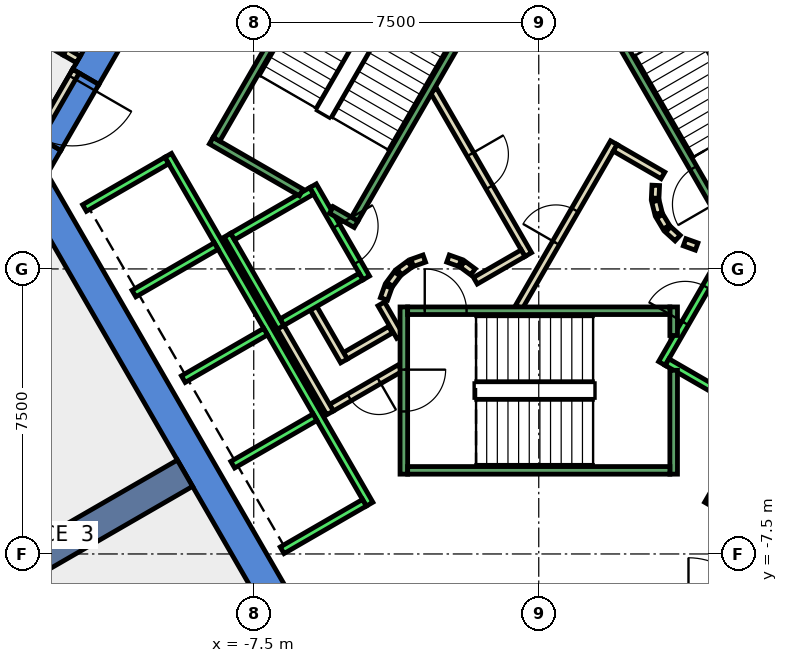
"""IFC4 building model, lengths in metres.
Left out: names, types, materials, properties, quantities, classifications, styles, units other than length and angle.
Written with IfcOpenShell. Run it as: python <this file> out.ifc"""

import sys

from ifc_helpers import new_model, si_unit, direction, frame, frame_2d, origin, place, context, subcontext, project, spatial, polyline, rectangle, outline, extrude, element, fill, save


model = new_model("IFC4")
c1 = context("Model", 3, precision=1e-05, world=origin(), true_north=direction((0.0, 1.0)))
c2 = subcontext(c1, "Body", "Model", "MODEL_VIEW")
j1 = project(units=[si_unit("LENGTHUNIT", "METRE"), si_unit("PLANEANGLEUNIT", "RADIAN")], contexts=[c1])
p1 = place(None, origin())
s1 = spatial("IfcSite", under=j1, at=p1, CompositionType="ELEMENT")
p2 = place(p1, origin())
s2 = spatial("IfcBuilding", under=s1, at=p2, CompositionType="ELEMENT")
p3 = place(p2, frame((0.0, 0.0, 159.2)))
s3 = spatial("IfcBuildingStorey", under=s2, at=p3, CompositionType="ELEMENT", Elevation=159.2)
p4 = place(p3, frame((0.0, 0.0, -0.4)))
e1 = element("IfcWall", 1, at=p4, inside=s3, PredefinedType="SHEAR", context=c2, shape_type="SweptSolid", body=[
    extrude(outline(polyline([(-12.267, 5.252), (-11.575, 4.852), (-6.466, 13.7), (-6.928, 14.5), (-12.267, 5.252)])), origin(), (0.0, 0.0, 1.0), 4.2),
])
p5 = place(p3, frame((0.0, 0.0, -0.4)))
e2 = element("IfcWall", 2, at=p5, inside=s3, PredefinedType="SHEAR", context=c2, shape_type="SweptSolid", body=[
    extrude(outline(polyline([(-12.575, 3.12), (-13.267, 3.52), (-13.856, 2.5), (-12.933, 2.5), (-12.575, 3.12)])), origin(), (0.0, 0.0, 1.0), 4.2),
])
p6 = place(p3, frame((0.0, 0.0, 3.6)))
e3 = element("IfcWall", 3, at=p6, inside=s3, PredefinedType="SHEAR", context=c2, shape_type="SweptSolid", body=[
    extrude(outline(polyline([(-13.267, 3.52), (-12.575, 3.12), (-11.575, 4.852), (-12.267, 5.252), (-13.267, 3.52)])), origin(), (0.0, 0.0, 1.0), 0.2),
])
p7 = place(p3, frame((0.0, 0.0, -0.4)))
e4 = element("IfcWall", 4, at=p7, inside=s3, PredefinedType="SHEAR", context=c2, shape_type="SweptSolid", body=[
    extrude(outline(polyline([(-13.856, 2.5), (-6.928, -9.5), (-6.466, -8.7), (-12.933, 2.5), (-13.856, 2.5)])), origin(), (0.0, 0.0, 1.0), 4.2),
])
p8 = place(p3, frame((-9.31, -5.375, -0.4), z_axis=(0.0, 0.0, 1.0), x_axis=(-0.866017533419, -0.500013631625, 0.0)))
e5 = element("IfcWall", 5, at=p8, inside=s3, PredefinedType="SHEAR", context=c2, shape_type="SweptSolid", body=[
    extrude(rectangle(XDim=9.0, YDim=0.8, at=frame_2d((4.5, 0.0))), origin(), (0.0, 0.0, 1.0), 4.2),
])
p9 = place(p3, frame((-14.359, 6.806, 0.0), z_axis=(0.0, 0.0, 1.0), x_axis=(0.866155875717, -0.499773947861, 0.0)))
e6 = element("IfcWall", 6, at=p9, inside=s3, PredefinedType="PARTITIONING", context=c2, shape_type="SweptSolid", body=[
    extrude(rectangle(XDim=2.189, YDim=0.2, at=frame_2d((1.094, 0.0))), origin(), (0.0, 0.0, 1.0), 3.8),
])
p10 = place(p3, frame((-3.9, -1.599, 0.0), z_axis=(0.0, 0.0, 1.0), x_axis=(-0.865969445389, -0.500096910261, 0.0)))
e7 = element("IfcWall", 7, at=p10, inside=s3, PredefinedType="PARTITIONING", context=c2, shape_type="SweptSolid", body=[
    extrude(rectangle(XDim=1.373, YDim=0.2, at=frame_2d((0.687, 0.0))), origin(), (0.0, 0.0, 1.0), 3.8),
])
p11 = place(p3, frame((-5.126, -2.422, 0.0), z_axis=(0.0, 0.0, 1.0), x_axis=(-0.500062241894, 0.865989465428, 0.0)))
e8 = element("IfcWall", 8, at=p11, inside=s3, PredefinedType="PARTITIONING", context=c2, shape_type="SweptSolid", body=[
    extrude(rectangle(XDim=1.7, YDim=0.2, at=frame_2d((0.85, 0.0))), origin(), (0.0, 0.0, 1.0), 3.8),
])
p12 = place(p3, frame((-3.65, -2.61, 0.0), z_axis=(0.0, 0.0, 1.0), x_axis=(-0.866072462134, -0.499918483688, 0.0)))
e9 = element("IfcWall", 9, at=p12, inside=s3, PredefinedType="PARTITIONING", context=c2, shape_type="SweptSolid", body=[
    extrude(rectangle(XDim=2.084, YDim=0.2, at=frame_2d((1.042, 0.0))), origin(), (0.0, 0.0, 1.0), 3.8),
])
p13 = place(p12, frame((0.642, 0.0, 0.0)))
e10 = element("IfcOpeningElement", 10, at=p13, cuts=e9, PredefinedType="OPENING", context=c2, shape_type="SweptSolid", body=[
    extrude(rectangle(XDim=0.9, YDim=2.1, at=frame_2d((0.45, 1.05))), frame((0.0, 0.11, 0.0), z_axis=(0.0, -1.0, 0.0), x_axis=(1.0, 0.0, 0.0)), (0.0, 0.0, 1.0), 0.22),
])
p14 = place(p3, frame((-5.492, -3.788, 0.0), z_axis=(0.0, 0.0, 1.0), x_axis=(-0.500008949224, 0.866020236886, 0.0)))
e11 = element("IfcWall", 11, at=p14, inside=s3, PredefinedType="PARTITIONING", context=c2, shape_type="SweptSolid", body=[
    extrude(rectangle(XDim=2.68, YDim=0.2, at=frame_2d((1.34, 0.0))), origin(), (0.0, 0.0, 1.0), 3.8),
])
p15 = place(p3, frame((-4.145, -0.92, 0.0), z_axis=(0.0, 0.0, 1.0), x_axis=(0.499743786207, -0.866173278362, 0.0)))
e12 = element("IfcWall", 12, at=p15, inside=s3, PredefinedType="PARTITIONING", context=c2, shape_type="SweptSolid", body=[
    extrude(rectangle(XDim=0.991, YDim=0.2, at=frame_2d((0.495, 0.0))), origin(), (0.0, 0.0, 1.0), 3.8),
])
p16 = place(p3, frame((-0.52, -1.0, 0.0), z_axis=(0.0, 0.0, 1.0), x_axis=(0.50011622646, 0.865958290007, 0.0)))
e13 = element("IfcWall", 13, at=p16, inside=s3, PredefinedType="PARTITIONING", context=c2, shape_type="SweptSolid", body=[
    extrude(rectangle(XDim=4.991, YDim=0.2, at=frame_2d((2.496, 0.0))), origin(), (0.0, 0.0, 1.0), 3.8),
])
p17 = place(p16, frame((1.945, 0.0, 0.0)))
e14 = element("IfcOpeningElement", 14, at=p17, cuts=e13, PredefinedType="OPENING", context=c2, shape_type="SweptSolid", body=[
    extrude(rectangle(XDim=1.0, YDim=2.1, at=frame_2d((0.5, 1.05))), frame((0.0, 0.11, 0.0), z_axis=(0.0, -1.0, 0.0), x_axis=(1.0, 0.0, 0.0)), (0.0, 0.0, 1.0), 0.22),
])
p18 = place(p3, frame((2.012, 3.186, 0.0), z_axis=(0.0, 0.0, 1.0), x_axis=(0.865891012941, -0.500232699559, 0.0)))
e15 = element("IfcWall", 15, at=p18, inside=s3, PredefinedType="PARTITIONING", context=c2, shape_type="SweptSolid", body=[
    extrude(rectangle(XDim=1.449, YDim=0.2, at=frame_2d((0.725, 0.0))), origin(), (0.0, 0.0, 1.0), 3.8),
])
p19 = place(p3, frame((3.079, 2.199, 0.0), z_axis=(0.0, 0.0, 1.0), x_axis=(-0.047771483479, -0.998858290933, 0.0)))
e16 = element("IfcWall", 16, at=p19, inside=s3, PredefinedType="PARTITIONING", context=c2, shape_type="SweptSolid", body=[
    extrude(rectangle(XDim=0.337, YDim=0.2, at=frame_2d((0.169, 0.0))), origin(), (0.0, 0.0, 1.0), 3.8),
])
p20 = place(p3, frame((3.07, 1.786, 0.0), z_axis=(0.0, 0.0, 1.0), x_axis=(0.242705583207, -0.970099994784, 0.0)))
e17 = element("IfcWall", 17, at=p20, inside=s3, PredefinedType="PARTITIONING", context=c2, shape_type="SweptSolid", body=[
    extrude(rectangle(XDim=0.338, YDim=0.2, at=frame_2d((0.169, 0.0))), origin(), (0.0, 0.0, 1.0), 3.8),
])
for number, where, z_axis, x_axis in (
    (18, (3.182, 1.388, 0.0), (0.0, 0.0, 1.0), (0.512, -0.859, 0.0)),
    (19, (3.404, 1.039, 0.0), (0.0, 0.0, 1.0), (0.74, -0.672, 0.0)),
):
    element("IfcWall", number, at=place(p3, frame(where, z_axis=z_axis, x_axis=x_axis)), inside=s3, PredefinedType="PARTITIONING", context=c2, shape_type="SweptSolid", body=[
        extrude(rectangle(XDim=0.338, YDim=0.2, at=frame_2d((0.169, 0.0))), origin(), (0.0, 0.0, 1.0), 3.8),
    ])
p21 = place(p3, frame((3.838, 0.702, 0.0), z_axis=(0.0, 0.0, 1.0), x_axis=(0.941035081519, -0.338308993895, 0.0)))
e20 = element("IfcWall", 20, at=p21, inside=s3, PredefinedType="PARTITIONING", context=c2, shape_type="SweptSolid", body=[
    extrude(rectangle(XDim=0.337, YDim=0.2, at=frame_2d((0.168, 0.0))), origin(), (0.0, 0.0, 1.0), 3.8),
])
p22 = place(p3, frame((-2.771, 4.7, 0.0), z_axis=(0.0, 0.0, 1.0), x_axis=(0.499969479948, -0.866043023828, 0.0)))
e21 = element("IfcWall", 21, at=p22, inside=s3, PredefinedType="PARTITIONING", context=c2, shape_type="SweptSolid", body=[
    extrude(rectangle(XDim=4.99, YDim=0.2, at=frame_2d((2.495, 0.0))), origin(), (0.0, 0.0, 1.0), 3.8),
])
p23 = place(p22, frame((1.945, 0.0, 0.0)))
e22 = element("IfcOpeningElement", 22, at=p23, cuts=e21, PredefinedType="OPENING", context=c2, shape_type="SweptSolid", body=[
    extrude(rectangle(XDim=1.0, YDim=2.1, at=frame_2d((0.5, 1.05))), frame((0.0, 0.11, 0.0), z_axis=(0.0, -1.0, 0.0), x_axis=(1.0, 0.0, 0.0)), (0.0, 0.0, 1.0), 0.22),
])
p24 = place(p3, frame((-0.412, 0.414, 0.0), z_axis=(0.0, 0.0, 1.0), x_axis=(-0.866017369001, -0.500013916395, 0.0)))
e23 = element("IfcWall", 23, at=p24, inside=s3, PredefinedType="PARTITIONING", context=c2, shape_type="SweptSolid", body=[
    extrude(rectangle(XDim=1.45, YDim=0.2, at=frame_2d((0.725, 0.0))), origin(), (0.0, 0.0, 1.0), 3.8),
])
p25 = place(p3, frame((-1.731, -0.077, 0.0), z_axis=(0.0, 0.0, 1.0), x_axis=(-0.804311165252, 0.594208338422, 0.0)))
e24 = element("IfcWall", 24, at=p25, inside=s3, PredefinedType="PARTITIONING", context=c2, shape_type="SweptSolid", body=[
    extrude(rectangle(XDim=0.338, YDim=0.2, at=frame_2d((0.169, 0.0))), origin(), (0.0, 0.0, 1.0), 3.8),
])
p26 = place(p3, frame((-2.07, 0.16, 0.0), z_axis=(0.0, 0.0, 1.0), x_axis=(-0.942199461132, 0.335052496547, 0.0)))
e25 = element("IfcWall", 25, at=p26, inside=s3, PredefinedType="PARTITIONING", context=c2, shape_type="SweptSolid", body=[
    extrude(rectangle(XDim=0.337, YDim=0.2, at=frame_2d((0.169, 0.0))), origin(), (0.0, 0.0, 1.0), 3.8),
])
p27 = place(p3, frame((-3.012, 0.273, 0.0), z_axis=(0.0, 0.0, 1.0), x_axis=(-0.942280615813, -0.334824194261, 0.0)))
e26 = element("IfcWall", 26, at=p27, inside=s3, PredefinedType="PARTITIONING", context=c2, shape_type="SweptSolid", body=[
    extrude(rectangle(XDim=0.338, YDim=0.2, at=frame_2d((0.169, 0.0))), origin(), (0.0, 0.0, 1.0), 3.8),
])
p28 = place(p3, frame((-3.397, 0.124, 0.0), z_axis=(0.0, 0.0, 1.0), x_axis=(-0.804311165252, -0.594208338422, 0.0)))
e27 = element("IfcWall", 27, at=p28, inside=s3, PredefinedType="PARTITIONING", context=c2, shape_type="SweptSolid", body=[
    extrude(rectangle(XDim=0.338, YDim=0.2, at=frame_2d((0.169, 0.0))), origin(), (0.0, 0.0, 1.0), 3.8),
])
p29 = place(p3, frame((-3.723, -0.131, 0.0), z_axis=(0.0, 0.0, 1.0), x_axis=(-0.594675113454, -0.803966112121, 0.0)))
e28 = element("IfcWall", 28, at=p29, inside=s3, PredefinedType="PARTITIONING", context=c2, shape_type="SweptSolid", body=[
    extrude(rectangle(XDim=0.338, YDim=0.2, at=frame_2d((0.169, 0.0))), origin(), (0.0, 0.0, 1.0), 3.8),
])
p30 = place(p3, frame((-3.96, -0.47, 0.0), z_axis=(0.0, 0.0, 1.0), x_axis=(-0.334824194261, -0.942280615813, 0.0)))
e29 = element("IfcWall", 29, at=p30, inside=s3, PredefinedType="PARTITIONING", context=c2, shape_type="SweptSolid", body=[
    extrude(rectangle(XDim=0.338, YDim=0.2, at=frame_2d((0.169, 0.0))), origin(), (0.0, 0.0, 1.0), 3.8),
])
p31 = place(p3, frame((-12.18, 5.202, 0.0), z_axis=(0.0, 0.0, 1.0), x_axis=(-0.50002537861, -0.866010750942, 0.0)))
e30 = element("IfcWall", 30, at=p31, inside=s3, PredefinedType="PARTITIONING", context=c2, shape_type="SweptSolid", body=[
    extrude(rectangle(XDim=2.0, YDim=0.2, at=frame_2d((1.0, 0.0))), origin(), (0.0, 0.0, 1.0), 2.4),
])
p32 = place(p31, frame((0.19, 0.0, 0.0)))
e31 = element("IfcOpeningElement", 31, at=p32, cuts=e30, PredefinedType="OPENING", context=c2, shape_type="SweptSolid", body=[
    extrude(rectangle(XDim=1.8, YDim=2.1, at=frame_2d((0.9, 1.05))), frame((0.0, 0.11, 0.0), z_axis=(0.0, -1.0, 0.0), x_axis=(1.0, 0.0, 0.0)), (0.0, 0.0, 1.0), 0.22),
])
p33 = place(p3, frame((-12.463, 5.712, 0.0), z_axis=(0.0, 0.0, 1.0), x_axis=(0.865788603161, -0.500409926597, 0.0)))
e32 = element("IfcWall", 32, at=p33, inside=s3, PredefinedType="PARTITIONING", context=c2, shape_type="SweptSolid", body=[
    extrude(rectangle(XDim=0.4, YDim=0.2, at=frame_2d((0.2, 0.0))), origin(), (0.0, 0.0, 1.0), 2.4),
])
p34 = place(p3, frame((-5.94, 2.188, 0.0), z_axis=(0.0, 0.0, 1.0), x_axis=(0.49994636267, -0.866056369097, 0.0)))
e33 = element("IfcWall", 33, at=p34, inside=s3, PredefinedType="STANDARD", context=c2, shape_type="SweptSolid", body=[
    extrude(rectangle(XDim=2.8, YDim=0.2, at=frame_2d((1.4, 0.0))), origin(), (0.0, 0.0, 1.0), 3.8),
])
p35 = place(p34, frame((1.225, 0.0, 0.0)))
e34 = element("IfcOpeningElement", 34, at=p35, cuts=e33, PredefinedType="OPENING", context=c2, shape_type="SweptSolid", body=[
    extrude(rectangle(XDim=1.1, YDim=2.1, at=frame_2d((0.55, 1.05))), frame((0.0, 0.11, 0.0), z_axis=(0.0, -1.0, 0.0), x_axis=(1.0, 0.0, 0.0)), (0.0, 0.0, 1.0), 0.22),
])
p36 = place(p3, frame((-8.192, 0.888, 0.0), z_axis=(0.0, 0.0, 1.0), x_axis=(0.49994636267, -0.866056369097, 0.0)))
e35 = element("IfcWall", 35, at=p36, inside=s3, PredefinedType="STANDARD", context=c2, shape_type="SweptSolid", body=[
    extrude(rectangle(XDim=2.8, YDim=0.2, at=frame_2d((1.4, 0.0))), origin(), (0.0, 0.0, 1.0), 3.8),
])
for number, where, z_axis, x_axis in (
    (36, (-5.977, 2.052, 0.0), (0.0, 0.0, 1.0), (-0.866, -0.5, 0.0)),
    (37, (-4.677, -0.2, 0.0), (0.0, 0.0, 1.0), (-0.866, -0.5, 0.0)),
):
    element("IfcWall", number, at=place(p3, frame(where, z_axis=z_axis, x_axis=x_axis)), inside=s3, PredefinedType="STANDARD", context=c2, shape_type="SweptSolid", body=[
        extrude(rectangle(XDim=2.399, YDim=0.2, at=frame_2d((1.2, 0.0))), origin(), (0.0, 0.0, 1.0), 3.8),
    ])
p37 = place(p3, frame((-9.751, 2.99, 0.0), z_axis=(0.0, 0.0, 1.0), x_axis=(0.50000090737, -0.866024879913, 0.0)))
e38 = element("IfcWall", 38, at=p37, inside=s3, PredefinedType="STANDARD", context=c2, shape_type="SweptSolid", body=[
    extrude(rectangle(XDim=10.6, YDim=0.2, at=frame_2d((5.3, 0.0))), origin(), (0.0, 0.0, 1.0), 3.8),
])
p38 = place(p3, frame((-9.788, 2.853, 0.0), z_axis=(0.0, 0.0, 1.0), x_axis=(-0.865998541277, -0.500046524342, 0.0)))
e39 = element("IfcWall", 39, at=p38, inside=s3, PredefinedType="STANDARD", context=c2, shape_type="SweptSolid", body=[
    extrude(rectangle(XDim=2.5, YDim=0.2, at=frame_2d((1.25, 0.0))), origin(), (0.0, 0.0, 1.0), 3.8),
])
for number, where, z_axis, x_axis in (
    (40, (-8.488, 0.602, 0.0), (0.0, 0.0, 1.0), (-0.866, -0.5, 0.0)),
    (41, (-7.188, -1.65, 0.0), (0.0, 0.0, 1.0), (-0.866, -0.5, 0.0)),
    (42, (-5.888, -3.902, 0.0), (0.0, 0.0, 1.0), (-0.866, -0.5, 0.0)),
    (43, (-4.588, -6.153, 0.0), (0.0, 0.0, 1.0), (-0.866, -0.5, 0.0)),
):
    element("IfcWall", number, at=place(p3, frame(where, z_axis=z_axis, x_axis=x_axis)), inside=s3, PredefinedType="STANDARD", context=c2, shape_type="SweptSolid", body=[
        extrude(rectangle(XDim=2.5, YDim=0.2, at=frame_2d((1.25, 0.0))), origin(), (0.0, 0.0, 1.0), 3.8),
    ])
p39 = place(p3, frame((3.24, -2.488, 0.0), z_axis=(0.0, 0.0, 1.0), x_axis=(0.49994636267, 0.866056369097, 0.0)))
e44 = element("IfcWall", 44, at=p39, inside=s3, PredefinedType="STANDARD", context=c2, shape_type="SweptSolid", body=[
    extrude(rectangle(XDim=2.8, YDim=0.2, at=frame_2d((1.4, 0.0))), origin(), (0.0, 0.0, 1.0), 3.8),
])
p40 = place(p39, frame((1.225, 0.0, 0.0)))
e45 = element("IfcOpeningElement", 45, at=p40, cuts=e44, PredefinedType="OPENING", context=c2, shape_type="SweptSolid", body=[
    extrude(rectangle(XDim=1.1, YDim=2.1, at=frame_2d((0.55, 1.05))), frame((0.0, 0.11, 0.0), z_axis=(0.0, -1.0, 0.0), x_axis=(1.0, 0.0, 0.0)), (0.0, 0.0, 1.0), 0.22),
])
p41 = place(p3, frame((3.377, -2.452, 0.0), z_axis=(0.0, 0.0, 1.0), x_axis=(0.865955154139, -0.50012165622, 0.0)))
e46 = element("IfcWall", 46, at=p41, inside=s3, PredefinedType="STANDARD", context=c2, shape_type="SweptSolid", body=[
    extrude(rectangle(XDim=2.4, YDim=0.2, at=frame_2d((1.2, 0.0))), origin(), (0.0, 0.0, 1.0), 3.8),
])
p42 = place(p3, frame((4.451, -6.19, 0.0), z_axis=(0.0, 0.0, 1.0), x_axis=(0.50000090737, 0.866024879913, 0.0)))
e47 = element("IfcWall", 47, at=p42, inside=s3, PredefinedType="STANDARD", context=c2, shape_type="SweptSolid", body=[
    extrude(rectangle(XDim=10.6, YDim=0.2, at=frame_2d((5.3, 0.0))), origin(), (0.0, 0.0, 1.0), 3.8),
])
p43 = place(p3, frame((-3.55, -1.0, 0.0), z_axis=(0.0, 0.0, 1.0), x_axis=(0.0, -1.0, 0.0)))
e48 = element("IfcWall", 48, at=p43, inside=s3, PredefinedType="STANDARD", context=c2, shape_type="SweptSolid", body=[
    extrude(rectangle(XDim=4.4, YDim=0.2, at=frame_2d((2.2, 0.0))), origin(), (0.0, 0.0, 1.0), 3.8),
])
p44 = place(p43, frame((1.65, 0.0, 0.0)))
e49 = element("IfcOpeningElement", 49, at=p44, cuts=e48, PredefinedType="OPENING", context=c2, shape_type="SweptSolid", body=[
    extrude(rectangle(XDim=1.1, YDim=2.2, at=frame_2d((0.55, 1.1))), frame((0.0, 0.11, 0.0), z_axis=(0.0, -1.0, 0.0), x_axis=(1.0, 0.0, 0.0)), (0.0, 0.0, 1.0), 0.22),
])
p45 = place(p3, frame((3.55, -2.667, 0.0), z_axis=(0.0, 0.0, 1.0), x_axis=(0.0, -1.0, 0.0)))
e50 = element("IfcWall", 50, at=p45, inside=s3, PredefinedType="STANDARD", context=c2, shape_type="SweptSolid", body=[
    extrude(rectangle(XDim=2.733, YDim=0.2, at=frame_2d((1.366, 0.0))), origin(), (0.0, 0.0, 1.0), 3.8),
])
p46 = place(p3, frame((3.55, -1.0, 0.0), z_axis=(0.0, 0.0, 1.0), x_axis=(0.0, -1.0, 0.0)))
e51 = element("IfcWall", 51, at=p46, inside=s3, PredefinedType="STANDARD", context=c2, shape_type="SweptSolid", body=[
    extrude(rectangle(XDim=0.751, YDim=0.2, at=frame_2d((0.375, 0.0))), origin(), (0.0, 0.0, 1.0), 3.8),
])
p47 = place(p3, frame((-3.45, -1.1, 0.0), z_axis=(0.0, 0.0, 1.0), x_axis=(1.0, 0.0, 0.0)))
e52 = element("IfcWall", 52, at=p47, inside=s3, PredefinedType="STANDARD", context=c2, shape_type="SweptSolid", body=[
    extrude(rectangle(XDim=6.9, YDim=0.2, at=frame_2d((3.45, 0.0))), origin(), (0.0, 0.0, 1.0), 3.8),
])
p48 = place(p47, frame((0.45, 0.0, 0.0)))
e53 = element("IfcOpeningElement", 53, at=p48, cuts=e52, PredefinedType="OPENING", context=c2, shape_type="SweptSolid", body=[
    extrude(rectangle(XDim=1.1, YDim=2.2, at=frame_2d((0.55, 1.1))), frame((0.0, 0.11, 0.0), z_axis=(0.0, -1.0, 0.0), x_axis=(1.0, 0.0, 0.0)), (0.0, 0.0, 1.0), 0.22),
])
p49 = place(p3, frame((-3.45, -5.3, 0.0), z_axis=(0.0, 0.0, 1.0), x_axis=(1.0, 0.0, 0.0)))
e54 = element("IfcWall", 54, at=p49, inside=s3, PredefinedType="STANDARD", context=c2, shape_type="SweptSolid", body=[
    extrude(rectangle(XDim=6.9, YDim=0.2, at=frame_2d((3.45, 0.0))), origin(), (0.0, 0.0, 1.0), 3.8),
])
p50 = place(p3, frame((4.843, 1.312, 0.0), z_axis=(0.0, 0.0, 1.0), x_axis=(-0.499963383562, 0.866046543262, 0.0)))
e55 = element("IfcWall", 55, at=p50, inside=s3, PredefinedType="STANDARD", context=c2, shape_type="SweptSolid", body=[
    extrude(rectangle(XDim=6.9, YDim=0.2, at=frame_2d((3.45, 0.0))), origin(), (0.0, 0.0, 1.0), 3.8),
])
p51 = place(p50, frame((0.45, 0.0, 0.0)))
e56 = element("IfcOpeningElement", 56, at=p51, cuts=e55, PredefinedType="OPENING", context=c2, shape_type="SweptSolid", body=[
    extrude(rectangle(XDim=1.1, YDim=2.2, at=frame_2d((0.55, 1.1))), frame((0.0, 0.11, 0.0), z_axis=(0.0, -1.0, 0.0), x_axis=(1.0, 0.0, 0.0)), (0.0, 0.0, 1.0), 0.22),
])
p52 = place(p3, frame((-6.25, 2.01, 0.0), z_axis=(0.0, 0.0, 1.0), x_axis=(-0.86611865017, 0.499838457731, 0.0)))
e57 = element("IfcWall", 57, at=p52, inside=s3, PredefinedType="STANDARD", context=c2, shape_type="SweptSolid", body=[
    extrude(rectangle(XDim=2.733, YDim=0.2, at=frame_2d((1.366, 0.0))), origin(), (0.0, 0.0, 1.0), 3.8),
])
p53 = place(p3, frame((-4.806, 1.176, 0.0), z_axis=(0.0, 0.0, 1.0), x_axis=(-0.866558586415, 0.499075361355, 0.0)))
e58 = element("IfcWall", 58, at=p53, inside=s3, PredefinedType="STANDARD", context=c2, shape_type="SweptSolid", body=[
    extrude(rectangle(XDim=0.751, YDim=0.2, at=frame_2d((0.376, 0.0))), origin(), (0.0, 0.0, 1.0), 3.8),
])
p54 = place(p3, frame((-1.393, 7.288, 0.0), z_axis=(0.0, 0.0, 1.0), x_axis=(-0.499963383562, -0.866046543262, 0.0)))
e59 = element("IfcWall", 59, at=p54, inside=s3, PredefinedType="STANDARD", context=c2, shape_type="SweptSolid", body=[
    extrude(rectangle(XDim=6.9, YDim=0.2, at=frame_2d((3.45, 0.0))), origin(), (0.0, 0.0, 1.0), 3.8),
])
p55 = place(p54, frame((0.45, 0.0, 0.0)))
e60 = element("IfcOpeningElement", 60, at=p55, cuts=e59, PredefinedType="OPENING", context=c2, shape_type="SweptSolid", body=[
    extrude(rectangle(XDim=1.1, YDim=2.2, at=frame_2d((0.55, 1.1))), frame((0.0, 0.11, 0.0), z_axis=(0.0, -1.0, 0.0), x_axis=(1.0, 0.0, 0.0)), (0.0, 0.0, 1.0), 0.22),
])
p56 = place(p3, frame((-5.03, 9.388, 0.0), z_axis=(0.0, 0.0, 1.0), x_axis=(-0.499978703459, -0.866037698999, 0.0)))
e61 = element("IfcWall", 61, at=p56, inside=s3, PredefinedType="STANDARD", context=c2, shape_type="SweptSolid", body=[
    extrude(rectangle(XDim=6.9, YDim=0.2, at=frame_2d((3.45, 0.0))), origin(), (0.0, 0.0, 1.0), 3.8),
])
p57 = place(p17, origin())
e62 = element("IfcDoor", 62, at=p57, inside=s3, OperationType="SINGLE_SWING_LEFT", PredefinedType="DOOR", context=c2, shape_type="SweptSolid", body=[
    extrude(rectangle(XDim=1.0, YDim=2.1, at=frame_2d((0.5, 1.05))), frame((0.0, 0.025, 0.0), z_axis=(0.0, -1.0, 0.0), x_axis=(1.0, 0.0, 0.0)), (0.0, 0.0, 1.0), 0.05),
])
fill(e14, e62)
p58 = place(p23, origin())
e63 = element("IfcDoor", 63, at=p58, inside=s3, OperationType="SINGLE_SWING_RIGHT", PredefinedType="DOOR", context=c2, shape_type="SweptSolid", body=[
    extrude(rectangle(XDim=1.0, YDim=2.1, at=frame_2d((0.5, 1.05))), frame((0.0, 0.025, 0.0), z_axis=(0.0, -1.0, 0.0), x_axis=(1.0, 0.0, 0.0)), (0.0, 0.0, 1.0), 0.05),
])
fill(e22, e63)
p59 = place(p13, origin())
e64 = element("IfcDoor", 64, at=p59, inside=s3, OperationType="SINGLE_SWING_LEFT", PredefinedType="DOOR", context=c2, shape_type="SweptSolid", body=[
    extrude(rectangle(XDim=0.9, YDim=2.1, at=frame_2d((0.45, 1.05))), frame((0.0, 0.025, 0.0), z_axis=(0.0, -1.0, 0.0), x_axis=(1.0, 0.0, 0.0)), (0.0, 0.0, 1.0), 0.05),
])
fill(e10, e64)
p60 = place(p32, origin())
e65 = element("IfcDoor", 65, at=p60, inside=s3, OperationType="DOUBLE_DOOR_SINGLE_SWING", PredefinedType="DOOR", context=c2, shape_type="SweptSolid", body=[
    extrude(rectangle(XDim=1.8, YDim=2.1, at=frame_2d((0.9, 1.05))), frame((0.0, 0.025, 0.0), z_axis=(0.0, -1.0, 0.0), x_axis=(1.0, 0.0, 0.0)), (0.0, 0.0, 1.0), 0.05),
])
fill(e31, e65)
p61 = place(p40, origin())
e66 = element("IfcDoor", 66, at=p61, inside=s3, OperationType="SLIDING_TO_LEFT", PredefinedType="DOOR", context=c2, shape_type="SweptSolid", body=[
    extrude(rectangle(XDim=1.1, YDim=2.1, at=frame_2d((0.55, 1.05))), frame((0.0, 0.025, 0.0), z_axis=(0.0, -1.0, 0.0), x_axis=(1.0, 0.0, 0.0)), (0.0, 0.0, 1.0), 0.05),
])
fill(e45, e66)
p62 = place(p35, origin())
e67 = element("IfcDoor", 67, at=p62, inside=s3, OperationType="SLIDING_TO_LEFT", PredefinedType="DOOR", context=c2, shape_type="SweptSolid", body=[
    extrude(rectangle(XDim=1.1, YDim=2.1, at=frame_2d((0.55, 1.05))), frame((0.0, 0.025, 0.0), z_axis=(0.0, -1.0, 0.0), x_axis=(1.0, 0.0, 0.0)), (0.0, 0.0, 1.0), 0.05),
])
fill(e34, e67)
p63 = place(p48, origin())
e68 = element("IfcDoor", 68, at=p63, inside=s3, OperationType="SINGLE_SWING_LEFT", PredefinedType="DOOR", context=c2, shape_type="SweptSolid", body=[
    extrude(rectangle(XDim=1.1, YDim=2.2, at=frame_2d((0.55, 1.1))), frame((0.0, 0.025, 0.0), z_axis=(0.0, -1.0, 0.0), x_axis=(1.0, 0.0, 0.0)), (0.0, 0.0, 1.0), 0.05),
])
fill(e53, e68)
p64 = place(p44, origin())
e69 = element("IfcDoor", 69, at=p64, inside=s3, OperationType="SINGLE_SWING_LEFT", PredefinedType="DOOR", context=c2, shape_type="SweptSolid", body=[
    extrude(rectangle(XDim=1.1, YDim=2.2, at=frame_2d((0.55, 1.1))), frame((0.0, 0.025, 0.0), z_axis=(0.0, -1.0, 0.0), x_axis=(1.0, 0.0, 0.0)), (0.0, 0.0, 1.0), 0.05),
])
fill(e49, e69)
p65 = place(p51, origin())
e70 = element("IfcDoor", 70, at=p65, inside=s3, OperationType="SINGLE_SWING_LEFT", PredefinedType="DOOR", context=c2, shape_type="SweptSolid", body=[
    extrude(rectangle(XDim=1.1, YDim=2.2, at=frame_2d((0.55, 1.1))), frame((0.0, 0.025, 0.0), z_axis=(0.0, -1.0, 0.0), x_axis=(1.0, 0.0, 0.0)), (0.0, 0.0, 1.0), 0.05),
])
fill(e56, e70)
save(model, sys.argv[1])
